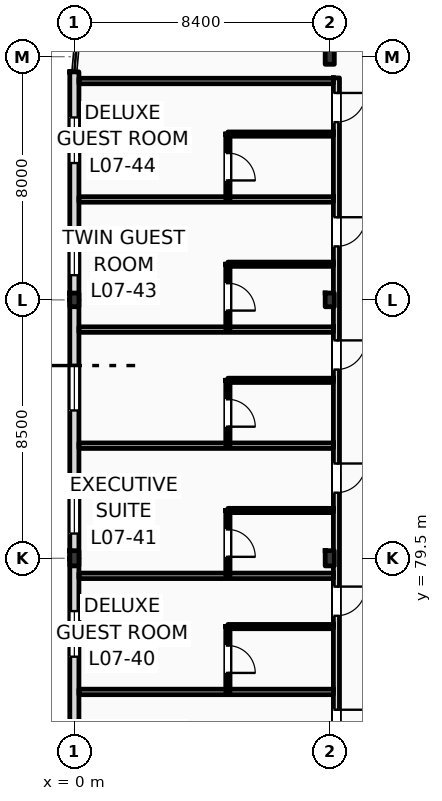
"""IFC4 building model, lengths in metres.
Left out: names, types, materials, properties, quantities, classifications, styles, units other than length and angle.
Written with IfcOpenShell. Run it as: python <this file> out.ifc"""

import sys

from ifc_helpers import new_model, si_unit, direction, frame, frame_2d, origin, origin_2d, place, context, subcontext, project, spatial, rectangle, i_section, extrude, element, fill, save


model = new_model("IFC4")
c1 = context("Model", 3, precision=1e-05, world=origin(), true_north=direction((0.0, 1.0)))
c2 = subcontext(c1, "Body", "Model", "MODEL_VIEW")
j1 = project(units=[si_unit("LENGTHUNIT", "METRE"), si_unit("PLANEANGLEUNIT", "RADIAN")], contexts=[c1])
p1 = place(None, origin())
s1 = spatial("IfcSite", under=j1, at=p1, CompositionType="ELEMENT")
p2 = place(p1, origin())
s2 = spatial("IfcBuilding", under=s1, at=p2, CompositionType="ELEMENT")
p3 = place(p2, frame((0.0, 0.0, 31.8)))
s3 = spatial("IfcBuildingStorey", under=s2, at=p3, CompositionType="ELEMENT", Elevation=31.8)
p4 = place(p3, frame((0.0, 79.5, 0.0), z_axis=(0.0, 0.0, 1.0), x_axis=(1.0, 0.0, 0.0)))
e1 = element("IfcColumn", 1, at=p4, inside=s3, PredefinedType="COLUMN", context=c2, shape_type="SweptSolid", body=[
    extrude(i_section(OverallWidth=0.3, OverallDepth=0.5, WebThickness=0.014, FlangeThickness=0.028, FilletRadius=0.027, at=origin_2d()), origin(), (0.0, 0.0, 1.0), 3.6),
])
p5 = place(p3, frame((0.0, 88.0, 0.0), z_axis=(0.0, 0.0, 1.0), x_axis=(1.0, 0.0, 0.0)))
e2 = element("IfcColumn", 2, at=p5, inside=s3, PredefinedType="COLUMN", context=c2, shape_type="SweptSolid", body=[
    extrude(i_section(OverallWidth=0.3, OverallDepth=0.45, WebThickness=0.014, FlangeThickness=0.026, FilletRadius=0.027, at=origin_2d()), origin(), (0.0, 0.0, 1.0), 3.6),
])
p6 = place(p3, frame((8.4, 79.5, 0.0), z_axis=(0.0, 0.0, 1.0), x_axis=(1.0, 0.0, 0.0)))
e3 = element("IfcColumn", 3, at=p6, inside=s3, PredefinedType="COLUMN", context=c2, shape_type="SweptSolid", body=[
    extrude(i_section(OverallWidth=0.3, OverallDepth=0.5, WebThickness=0.014, FlangeThickness=0.028, FilletRadius=0.027, at=origin_2d()), origin(), (0.0, 0.0, 1.0), 3.6),
])
p7 = place(p3, frame((8.4, 88.0, 0.0), z_axis=(0.0, 0.0, 1.0), x_axis=(1.0, 0.0, 0.0)))
e4 = element("IfcColumn", 4, at=p7, inside=s3, PredefinedType="COLUMN", context=c2, shape_type="SweptSolid", body=[
    extrude(i_section(OverallWidth=0.3, OverallDepth=0.45, WebThickness=0.014, FlangeThickness=0.026, FilletRadius=0.027, at=origin_2d()), origin(), (0.0, 0.0, 1.0), 3.6),
])
p8 = place(p3, frame((8.4, 96.0, 0.0), z_axis=(0.0, 0.0, 1.0), x_axis=(1.0, 0.0, 0.0)))
e5 = element("IfcColumn", 5, at=p8, inside=s3, PredefinedType="COLUMN", context=c2, shape_type="SweptSolid", body=[
    extrude(i_section(OverallWidth=0.3, OverallDepth=0.5, WebThickness=0.014, FlangeThickness=0.028, FilletRadius=0.027, at=origin_2d()), origin(), (0.0, 0.0, 1.0), 3.6),
])
p9 = place(p3, frame((0.0, 71.0, 0.0), z_axis=(0.0, 0.0, 1.0), x_axis=(0.0, 1.0, 0.0)))
e6 = element("IfcWall", 6, at=p9, inside=s3, PredefinedType="STANDARD", context=c2, shape_type="SweptSolid", body=[
    extrude(rectangle(XDim=8.5, YDim=0.3, at=frame_2d((4.25, 0.0))), origin(), (0.0, 0.0, 1.0), 2.99),
])
p10 = place(p9, frame((1.213, 0.0, 0.9)))
e7 = element("IfcOpeningElement", 7, at=p10, cuts=e6, PredefinedType="OPENING", context=c2, shape_type="SweptSolid", body=[
    extrude(rectangle(XDim=1.5, YDim=1.91, at=frame_2d((0.75, 0.955))), frame((0.0, 0.16, 0.0), z_axis=(0.0, -1.0, 0.0), x_axis=(1.0, 0.0, 0.0)), (0.0, 0.0, 1.0), 0.32),
])
p11 = place(p9, frame((5.263, 0.0, 0.9)))
e8 = element("IfcOpeningElement", 8, at=p11, cuts=e6, PredefinedType="OPENING", context=c2, shape_type="SweptSolid", body=[
    extrude(rectangle(XDim=1.5, YDim=1.91, at=frame_2d((0.75, 0.955))), frame((0.0, 0.16, 0.0), z_axis=(0.0, -1.0, 0.0), x_axis=(1.0, 0.0, 0.0)), (0.0, 0.0, 1.0), 0.32),
])
p12 = place(p3, frame((0.0, 79.5, 0.0), z_axis=(0.0, 0.0, 1.0), x_axis=(0.0, 1.0, 0.0)))
e9 = element("IfcWall", 9, at=p12, inside=s3, PredefinedType="STANDARD", context=c2, shape_type="SweptSolid", body=[
    extrude(rectangle(XDim=8.5, YDim=0.3, at=frame_2d((4.25, 0.0))), origin(), (0.0, 0.0, 1.0), 2.99),
])
p13 = place(p12, frame((0.814, 0.0, 0.9)))
e10 = element("IfcOpeningElement", 10, at=p13, cuts=e9, PredefinedType="OPENING", context=c2, shape_type="SweptSolid", body=[
    extrude(rectangle(XDim=1.5, YDim=1.91, at=frame_2d((0.75, 0.955))), frame((0.0, 0.16, 0.0), z_axis=(0.0, -1.0, 0.0), x_axis=(1.0, 0.0, 0.0)), (0.0, 0.0, 1.0), 0.32),
])
p14 = place(p12, frame((4.863, 0.0, 0.9)))
e11 = element("IfcOpeningElement", 11, at=p14, cuts=e9, PredefinedType="OPENING", context=c2, shape_type="SweptSolid", body=[
    extrude(rectangle(XDim=1.5, YDim=1.91, at=frame_2d((0.75, 0.955))), frame((0.0, 0.16, 0.0), z_axis=(0.0, -1.0, 0.0), x_axis=(1.0, 0.0, 0.0)), (0.0, 0.0, 1.0), 0.32),
])
p15 = place(p3, frame((0.0, 88.0, 0.0), z_axis=(0.0, 0.0, 1.0), x_axis=(0.0, 1.0, 0.0)))
e12 = element("IfcWall", 12, at=p15, inside=s3, PredefinedType="STANDARD", context=c2, shape_type="SweptSolid", body=[
    extrude(rectangle(XDim=7.5, YDim=0.3, at=frame_2d((3.75, 0.0))), origin(), (0.0, 0.0, 1.0), 3.36),
])
p16 = place(p15, frame((0.813, 0.0, 0.9)))
e13 = element("IfcOpeningElement", 13, at=p16, cuts=e12, PredefinedType="OPENING", context=c2, shape_type="SweptSolid", body=[
    extrude(rectangle(XDim=1.5, YDim=2.28, at=frame_2d((0.75, 1.14))), frame((0.0, 0.16, 0.0), z_axis=(0.0, -1.0, 0.0), x_axis=(1.0, 0.0, 0.0)), (0.0, 0.0, 1.0), 0.32),
])
p17 = place(p15, frame((4.502, 0.0, 0.9)))
e14 = element("IfcOpeningElement", 14, at=p17, cuts=e12, PredefinedType="OPENING", context=c2, shape_type="SweptSolid", body=[
    extrude(rectangle(XDim=1.5, YDim=2.28, at=frame_2d((0.75, 1.14))), frame((0.0, 0.16, 0.0), z_axis=(0.0, -1.0, 0.0), x_axis=(1.0, 0.0, 0.0)), (0.0, 0.0, 1.0), 0.32),
])
p18 = place(p3, frame((8.62, 62.64, 0.0), z_axis=(0.0, 0.0, 1.0), x_axis=(0.0, 1.0, 0.0)))
e15 = element("IfcWall", 15, at=p18, inside=s3, PredefinedType="PARTITIONING", context=c2, shape_type="SweptSolid", body=[
    extrude(rectangle(XDim=32.66, YDim=0.2, at=frame_2d((16.33, 0.0))), origin(), (0.0, 0.0, 1.0), 2.99),
])
p19 = place(p18, frame((2.857, 0.0, 0.0)))
e16 = element("IfcOpeningElement", 16, at=p19, cuts=e15, PredefinedType="OPENING", context=c2, shape_type="SweptSolid", body=[
    extrude(rectangle(XDim=0.96, YDim=2.2, at=frame_2d((0.48, 1.1))), frame((0.0, 0.11, 0.0), z_axis=(0.0, -1.0, 0.0), x_axis=(1.0, 0.0, 0.0)), (0.0, 0.0, 1.0), 0.22),
])
p20 = place(p18, frame((4.719, 0.0, 0.0)))
e17 = element("IfcOpeningElement", 17, at=p20, cuts=e15, PredefinedType="OPENING", context=c2, shape_type="SweptSolid", body=[
    extrude(rectangle(XDim=0.96, YDim=2.2, at=frame_2d((0.48, 1.1))), frame((0.0, 0.11, 0.0), z_axis=(0.0, -1.0, 0.0), x_axis=(1.0, 0.0, 0.0)), (0.0, 0.0, 1.0), 0.22),
])
p21 = place(p18, frame((10.918, 0.0, 0.0)))
e18 = element("IfcOpeningElement", 18, at=p21, cuts=e15, PredefinedType="OPENING", context=c2, shape_type="SweptSolid", body=[
    extrude(rectangle(XDim=0.96, YDim=2.2, at=frame_2d((0.48, 1.1))), frame((0.0, 0.11, 0.0), z_axis=(0.0, -1.0, 0.0), x_axis=(1.0, 0.0, 0.0)), (0.0, 0.0, 1.0), 0.22),
])
p22 = place(p18, frame((14.969, 0.0, 0.0)))
e19 = element("IfcOpeningElement", 19, at=p22, cuts=e15, PredefinedType="OPENING", context=c2, shape_type="SweptSolid", body=[
    extrude(rectangle(XDim=0.96, YDim=2.2, at=frame_2d((0.48, 1.1))), frame((0.0, 0.11, 0.0), z_axis=(0.0, -1.0, 0.0), x_axis=(1.0, 0.0, 0.0)), (0.0, 0.0, 1.0), 0.22),
])
p23 = place(p18, frame((19.018, 0.0, 0.0)))
e20 = element("IfcOpeningElement", 20, at=p23, cuts=e15, PredefinedType="OPENING", context=c2, shape_type="SweptSolid", body=[
    extrude(rectangle(XDim=0.96, YDim=2.2, at=frame_2d((0.48, 1.1))), frame((0.0, 0.11, 0.0), z_axis=(0.0, -1.0, 0.0), x_axis=(1.0, 0.0, 0.0)), (0.0, 0.0, 1.0), 0.22),
])
p24 = place(p18, frame((23.068, 0.0, 0.0)))
e21 = element("IfcOpeningElement", 21, at=p24, cuts=e15, PredefinedType="OPENING", context=c2, shape_type="SweptSolid", body=[
    extrude(rectangle(XDim=0.96, YDim=2.2, at=frame_2d((0.48, 1.1))), frame((0.0, 0.11, 0.0), z_axis=(0.0, -1.0, 0.0), x_axis=(1.0, 0.0, 0.0)), (0.0, 0.0, 1.0), 0.22),
])
p25 = place(p18, frame((27.119, 0.0, 0.0)))
e22 = element("IfcOpeningElement", 22, at=p25, cuts=e15, PredefinedType="OPENING", context=c2, shape_type="SweptSolid", body=[
    extrude(rectangle(XDim=0.96, YDim=2.2, at=frame_2d((0.48, 1.1))), frame((0.0, 0.11, 0.0), z_axis=(0.0, -1.0, 0.0), x_axis=(1.0, 0.0, 0.0)), (0.0, 0.0, 1.0), 0.22),
])
p26 = place(p18, frame((31.207, 0.0, 0.0)))
e23 = element("IfcOpeningElement", 23, at=p26, cuts=e15, PredefinedType="OPENING", context=c2, shape_type="SweptSolid", body=[
    extrude(rectangle(XDim=0.96, YDim=2.2, at=frame_2d((0.48, 1.1))), frame((0.0, 0.11, 0.0), z_axis=(0.0, -1.0, 0.0), x_axis=(1.0, 0.0, 0.0)), (0.0, 0.0, 1.0), 0.22),
])
for number, where, z_axis, x_axis in (
    (24, (0.15, 75.104, 0.0), (0.0, 0.0, 1.0), (1.0, 0.0, 0.0)),
    (25, (0.15, 78.923, 0.0), (0.0, 0.0, 1.0), (1.0, 0.0, 0.0)),
):
    element("IfcWall", number, at=place(p3, frame(where, z_axis=z_axis, x_axis=x_axis)), inside=s3, PredefinedType="PARTITIONING", context=c2, shape_type="SweptSolid", body=[
        extrude(rectangle(XDim=8.37, YDim=0.18, at=frame_2d((4.185, 0.0))), origin(), (0.0, 0.0, 1.0), 3.36),
    ])
p27 = place(p3, frame((5.05, 77.254, 0.0), z_axis=(0.0, 0.0, 1.0), x_axis=(1.0, 0.0, 0.0)))
e26 = element("IfcWall", 26, at=p27, inside=s3, PredefinedType="PARTITIONING", context=c2, shape_type="SweptSolid", body=[
    extrude(rectangle(XDim=3.47, YDim=0.14, at=frame_2d((1.735, 0.0))), origin(), (0.0, 0.0, 1.0), 3.36),
])
p28 = place(p3, frame((5.05, 75.104, 0.0), z_axis=(0.0, 0.0, 1.0), x_axis=(0.0, 1.0, 0.0)))
e27 = element("IfcWall", 27, at=p28, inside=s3, PredefinedType="PARTITIONING", context=c2, shape_type="SweptSolid", body=[
    extrude(rectangle(XDim=2.15, YDim=0.14, at=frame_2d((1.075, 0.0))), origin(), (0.0, 0.0, 1.0), 3.36),
])
p29 = place(p28, frame((0.625, 0.0, 0.0)))
e28 = element("IfcOpeningElement", 28, at=p29, cuts=e27, PredefinedType="OPENING", context=c2, shape_type="SweptSolid", body=[
    extrude(rectangle(XDim=0.9, YDim=2.1, at=frame_2d((0.45, 1.05))), frame((0.0, 0.08, 0.0), z_axis=(0.0, -1.0, 0.0), x_axis=(1.0, 0.0, 0.0)), (0.0, 0.0, 1.0), 0.16),
])
p30 = place(p3, frame((0.15, 83.204, 0.0), z_axis=(0.0, 0.0, 1.0), x_axis=(1.0, 0.0, 0.0)))
e29 = element("IfcWall", 29, at=p30, inside=s3, PredefinedType="PARTITIONING", context=c2, shape_type="SweptSolid", body=[
    extrude(rectangle(XDim=8.37, YDim=0.18, at=frame_2d((4.185, 0.0))), origin(), (0.0, 0.0, 1.0), 3.36),
])
p31 = place(p3, frame((5.05, 81.073, 0.0), z_axis=(0.0, 0.0, 1.0), x_axis=(1.0, 0.0, 0.0)))
e30 = element("IfcWall", 30, at=p31, inside=s3, PredefinedType="PARTITIONING", context=c2, shape_type="SweptSolid", body=[
    extrude(rectangle(XDim=3.47, YDim=0.14, at=frame_2d((1.735, 0.0))), origin(), (0.0, 0.0, 1.0), 3.36),
])
p32 = place(p3, frame((5.05, 78.923, 0.0), z_axis=(0.0, 0.0, 1.0), x_axis=(0.0, 1.0, 0.0)))
e31 = element("IfcWall", 31, at=p32, inside=s3, PredefinedType="PARTITIONING", context=c2, shape_type="SweptSolid", body=[
    extrude(rectangle(XDim=2.15, YDim=0.14, at=frame_2d((1.075, 0.0))), origin(), (0.0, 0.0, 1.0), 3.36),
])
p33 = place(p32, frame((0.625, 0.0, 0.0)))
e32 = element("IfcOpeningElement", 32, at=p33, cuts=e31, PredefinedType="OPENING", context=c2, shape_type="SweptSolid", body=[
    extrude(rectangle(XDim=0.9, YDim=2.1, at=frame_2d((0.45, 1.05))), frame((0.0, 0.08, 0.0), z_axis=(0.0, -1.0, 0.0), x_axis=(1.0, 0.0, 0.0)), (0.0, 0.0, 1.0), 0.16),
])
p34 = place(p3, frame((0.15, 87.023, 0.0), z_axis=(0.0, 0.0, 1.0), x_axis=(1.0, 0.0, 0.0)))
e33 = element("IfcWall", 33, at=p34, inside=s3, PredefinedType="PARTITIONING", context=c2, shape_type="SweptSolid", body=[
    extrude(rectangle(XDim=8.37, YDim=0.18, at=frame_2d((4.185, 0.0))), origin(), (0.0, 0.0, 1.0), 3.36),
])
p35 = place(p3, frame((5.05, 85.354, 0.0), z_axis=(0.0, 0.0, 1.0), x_axis=(1.0, 0.0, 0.0)))
e34 = element("IfcWall", 34, at=p35, inside=s3, PredefinedType="PARTITIONING", context=c2, shape_type="SweptSolid", body=[
    extrude(rectangle(XDim=3.47, YDim=0.14, at=frame_2d((1.735, 0.0))), origin(), (0.0, 0.0, 1.0), 3.36),
])
p36 = place(p3, frame((5.05, 83.204, 0.0), z_axis=(0.0, 0.0, 1.0), x_axis=(0.0, 1.0, 0.0)))
e35 = element("IfcWall", 35, at=p36, inside=s3, PredefinedType="PARTITIONING", context=c2, shape_type="SweptSolid", body=[
    extrude(rectangle(XDim=2.15, YDim=0.14, at=frame_2d((1.075, 0.0))), origin(), (0.0, 0.0, 1.0), 3.36),
])
p37 = place(p36, frame((0.625, 0.0, 0.0)))
e36 = element("IfcOpeningElement", 36, at=p37, cuts=e35, PredefinedType="OPENING", context=c2, shape_type="SweptSolid", body=[
    extrude(rectangle(XDim=0.9, YDim=2.1, at=frame_2d((0.45, 1.05))), frame((0.0, 0.08, 0.0), z_axis=(0.0, -1.0, 0.0), x_axis=(1.0, 0.0, 0.0)), (0.0, 0.0, 1.0), 0.16),
])
p38 = place(p3, frame((0.15, 91.304, 0.0), z_axis=(0.0, 0.0, 1.0), x_axis=(1.0, 0.0, 0.0)))
e37 = element("IfcWall", 37, at=p38, inside=s3, PredefinedType="PARTITIONING", context=c2, shape_type="SweptSolid", body=[
    extrude(rectangle(XDim=8.37, YDim=0.18, at=frame_2d((4.185, 0.0))), origin(), (0.0, 0.0, 1.0), 3.36),
])
p39 = place(p3, frame((5.05, 89.173, 0.0), z_axis=(0.0, 0.0, 1.0), x_axis=(1.0, 0.0, 0.0)))
e38 = element("IfcWall", 38, at=p39, inside=s3, PredefinedType="PARTITIONING", context=c2, shape_type="SweptSolid", body=[
    extrude(rectangle(XDim=3.47, YDim=0.14, at=frame_2d((1.735, 0.0))), origin(), (0.0, 0.0, 1.0), 3.36),
])
p40 = place(p3, frame((5.05, 87.023, 0.0), z_axis=(0.0, 0.0, 1.0), x_axis=(0.0, 1.0, 0.0)))
e39 = element("IfcWall", 39, at=p40, inside=s3, PredefinedType="PARTITIONING", context=c2, shape_type="SweptSolid", body=[
    extrude(rectangle(XDim=2.15, YDim=0.14, at=frame_2d((1.075, 0.0))), origin(), (0.0, 0.0, 1.0), 3.36),
])
p41 = place(p40, frame((0.625, 0.0, 0.0)))
e40 = element("IfcOpeningElement", 40, at=p41, cuts=e39, PredefinedType="OPENING", context=c2, shape_type="SweptSolid", body=[
    extrude(rectangle(XDim=0.9, YDim=2.1, at=frame_2d((0.45, 1.05))), frame((0.0, 0.08, 0.0), z_axis=(0.0, -1.0, 0.0), x_axis=(1.0, 0.0, 0.0)), (0.0, 0.0, 1.0), 0.16),
])
p42 = place(p3, frame((0.15, 95.2, 0.0), z_axis=(0.0, 0.0, 1.0), x_axis=(1.0, 0.0, 0.0)))
e41 = element("IfcWall", 41, at=p42, inside=s3, PredefinedType="PARTITIONING", context=c2, shape_type="SweptSolid", body=[
    extrude(rectangle(XDim=8.37, YDim=0.18, at=frame_2d((4.185, 0.0))), origin(), (0.0, 0.0, 1.0), 3.36),
])
p43 = place(p3, frame((5.05, 93.454, 0.0), z_axis=(0.0, 0.0, 1.0), x_axis=(1.0, 0.0, 0.0)))
e42 = element("IfcWall", 42, at=p43, inside=s3, PredefinedType="PARTITIONING", context=c2, shape_type="SweptSolid", body=[
    extrude(rectangle(XDim=3.47, YDim=0.14, at=frame_2d((1.735, 0.0))), origin(), (0.0, 0.0, 1.0), 3.36),
])
p44 = place(p3, frame((5.05, 91.304, 0.0), z_axis=(0.0, 0.0, 1.0), x_axis=(0.0, 1.0, 0.0)))
e43 = element("IfcWall", 43, at=p44, inside=s3, PredefinedType="PARTITIONING", context=c2, shape_type="SweptSolid", body=[
    extrude(rectangle(XDim=2.15, YDim=0.14, at=frame_2d((1.075, 0.0))), origin(), (0.0, 0.0, 1.0), 3.36),
])
p45 = place(p44, frame((0.625, 0.0, 0.0)))
e44 = element("IfcOpeningElement", 44, at=p45, cuts=e43, PredefinedType="OPENING", context=c2, shape_type="SweptSolid", body=[
    extrude(rectangle(XDim=0.9, YDim=2.1, at=frame_2d((0.45, 1.05))), frame((0.0, 0.08, 0.0), z_axis=(0.0, -1.0, 0.0), x_axis=(1.0, 0.0, 0.0)), (0.0, 0.0, 1.0), 0.16),
])
p46 = place(p11, origin())
e45 = element("IfcWindow", 45, at=p46, inside=s3, PartitioningType="DOUBLE_PANEL_VERTICAL", PredefinedType="WINDOW", context=c2, shape_type="SweptSolid", body=[
    extrude(rectangle(XDim=1.5, YDim=1.91, at=frame_2d((0.75, 0.955))), frame((0.0, 0.03, 0.0), z_axis=(0.0, -1.0, 0.0), x_axis=(1.0, 0.0, 0.0)), (0.0, 0.0, 1.0), 0.06),
])
fill(e8, e45)
p47 = place(p13, origin())
e46 = element("IfcWindow", 46, at=p47, inside=s3, PartitioningType="DOUBLE_PANEL_VERTICAL", PredefinedType="WINDOW", context=c2, shape_type="SweptSolid", body=[
    extrude(rectangle(XDim=1.5, YDim=1.91, at=frame_2d((0.75, 0.955))), frame((0.0, 0.03, 0.0), z_axis=(0.0, -1.0, 0.0), x_axis=(1.0, 0.0, 0.0)), (0.0, 0.0, 1.0), 0.06),
])
fill(e10, e46)
p48 = place(p14, origin())
e47 = element("IfcWindow", 47, at=p48, inside=s3, PartitioningType="DOUBLE_PANEL_VERTICAL", PredefinedType="WINDOW", context=c2, shape_type="SweptSolid", body=[
    extrude(rectangle(XDim=1.5, YDim=1.91, at=frame_2d((0.75, 0.955))), frame((0.0, 0.03, 0.0), z_axis=(0.0, -1.0, 0.0), x_axis=(1.0, 0.0, 0.0)), (0.0, 0.0, 1.0), 0.06),
])
fill(e11, e47)
p49 = place(p16, origin())
e48 = element("IfcWindow", 48, at=p49, inside=s3, PartitioningType="DOUBLE_PANEL_VERTICAL", PredefinedType="WINDOW", context=c2, shape_type="SweptSolid", body=[
    extrude(rectangle(XDim=1.5, YDim=2.28, at=frame_2d((0.75, 1.14))), frame((0.0, 0.03, 0.0), z_axis=(0.0, -1.0, 0.0), x_axis=(1.0, 0.0, 0.0)), (0.0, 0.0, 1.0), 0.06),
])
fill(e13, e48)
p50 = place(p17, origin())
e49 = element("IfcWindow", 49, at=p50, inside=s3, PartitioningType="DOUBLE_PANEL_VERTICAL", PredefinedType="WINDOW", context=c2, shape_type="SweptSolid", body=[
    extrude(rectangle(XDim=1.5, YDim=2.28, at=frame_2d((0.75, 1.14))), frame((0.0, 0.03, 0.0), z_axis=(0.0, -1.0, 0.0), x_axis=(1.0, 0.0, 0.0)), (0.0, 0.0, 1.0), 0.06),
])
fill(e14, e49)
p51 = place(p21, frame((0.96, 0.0, 0.0), z_axis=(0.0, 0.0, 1.0), x_axis=(-1.0, 0.0, 0.0)))
e50 = element("IfcDoor", 50, at=p51, inside=s3, OperationType="SINGLE_SWING_RIGHT", PredefinedType="DOOR", context=c2, shape_type="SweptSolid", body=[
    extrude(rectangle(XDim=0.96, YDim=2.2, at=frame_2d((0.48, 1.1))), frame((0.0, 0.025, 0.0), z_axis=(0.0, -1.0, 0.0), x_axis=(1.0, 0.0, 0.0)), (0.0, 0.0, 1.0), 0.05),
])
fill(e18, e50)
p52 = place(p22, frame((0.96, 0.0, 0.0), z_axis=(0.0, 0.0, 1.0), x_axis=(-1.0, 0.0, 0.0)))
e51 = element("IfcDoor", 51, at=p52, inside=s3, OperationType="SINGLE_SWING_RIGHT", PredefinedType="DOOR", context=c2, shape_type="SweptSolid", body=[
    extrude(rectangle(XDim=0.96, YDim=2.2, at=frame_2d((0.48, 1.1))), frame((0.0, 0.025, 0.0), z_axis=(0.0, -1.0, 0.0), x_axis=(1.0, 0.0, 0.0)), (0.0, 0.0, 1.0), 0.05),
])
fill(e19, e51)
p53 = place(p29, frame((0.9, 0.0, 0.0), z_axis=(0.0, 0.0, 1.0), x_axis=(-1.0, 0.0, 0.0)))
e52 = element("IfcDoor", 52, at=p53, inside=s3, OperationType="SINGLE_SWING_LEFT", PredefinedType="DOOR", context=c2, shape_type="SweptSolid", body=[
    extrude(rectangle(XDim=0.9, YDim=2.1, at=frame_2d((0.45, 1.05))), frame((0.0, 0.025, 0.0), z_axis=(0.0, -1.0, 0.0), x_axis=(1.0, 0.0, 0.0)), (0.0, 0.0, 1.0), 0.05),
])
fill(e28, e52)
p54 = place(p23, frame((0.96, 0.0, 0.0), z_axis=(0.0, 0.0, 1.0), x_axis=(-1.0, 0.0, 0.0)))
e53 = element("IfcDoor", 53, at=p54, inside=s3, OperationType="SINGLE_SWING_RIGHT", PredefinedType="DOOR", context=c2, shape_type="SweptSolid", body=[
    extrude(rectangle(XDim=0.96, YDim=2.2, at=frame_2d((0.48, 1.1))), frame((0.0, 0.025, 0.0), z_axis=(0.0, -1.0, 0.0), x_axis=(1.0, 0.0, 0.0)), (0.0, 0.0, 1.0), 0.05),
])
fill(e20, e53)
p55 = place(p33, frame((0.9, 0.0, 0.0), z_axis=(0.0, 0.0, 1.0), x_axis=(-1.0, 0.0, 0.0)))
e54 = element("IfcDoor", 54, at=p55, inside=s3, OperationType="SINGLE_SWING_LEFT", PredefinedType="DOOR", context=c2, shape_type="SweptSolid", body=[
    extrude(rectangle(XDim=0.9, YDim=2.1, at=frame_2d((0.45, 1.05))), frame((0.0, 0.025, 0.0), z_axis=(0.0, -1.0, 0.0), x_axis=(1.0, 0.0, 0.0)), (0.0, 0.0, 1.0), 0.05),
])
fill(e32, e54)
p56 = place(p24, frame((0.96, 0.0, 0.0), z_axis=(0.0, 0.0, 1.0), x_axis=(-1.0, 0.0, 0.0)))
e55 = element("IfcDoor", 55, at=p56, inside=s3, OperationType="SINGLE_SWING_RIGHT", PredefinedType="DOOR", context=c2, shape_type="SweptSolid", body=[
    extrude(rectangle(XDim=0.96, YDim=2.2, at=frame_2d((0.48, 1.1))), frame((0.0, 0.025, 0.0), z_axis=(0.0, -1.0, 0.0), x_axis=(1.0, 0.0, 0.0)), (0.0, 0.0, 1.0), 0.05),
])
fill(e21, e55)
p57 = place(p37, frame((0.9, 0.0, 0.0), z_axis=(0.0, 0.0, 1.0), x_axis=(-1.0, 0.0, 0.0)))
e56 = element("IfcDoor", 56, at=p57, inside=s3, OperationType="SINGLE_SWING_LEFT", PredefinedType="DOOR", context=c2, shape_type="SweptSolid", body=[
    extrude(rectangle(XDim=0.9, YDim=2.1, at=frame_2d((0.45, 1.05))), frame((0.0, 0.025, 0.0), z_axis=(0.0, -1.0, 0.0), x_axis=(1.0, 0.0, 0.0)), (0.0, 0.0, 1.0), 0.05),
])
fill(e36, e56)
p58 = place(p25, frame((0.96, 0.0, 0.0), z_axis=(0.0, 0.0, 1.0), x_axis=(-1.0, 0.0, 0.0)))
e57 = element("IfcDoor", 57, at=p58, inside=s3, OperationType="SINGLE_SWING_RIGHT", PredefinedType="DOOR", context=c2, shape_type="SweptSolid", body=[
    extrude(rectangle(XDim=0.96, YDim=2.2, at=frame_2d((0.48, 1.1))), frame((0.0, 0.025, 0.0), z_axis=(0.0, -1.0, 0.0), x_axis=(1.0, 0.0, 0.0)), (0.0, 0.0, 1.0), 0.05),
])
fill(e22, e57)
p59 = place(p41, frame((0.9, 0.0, 0.0), z_axis=(0.0, 0.0, 1.0), x_axis=(-1.0, 0.0, 0.0)))
e58 = element("IfcDoor", 58, at=p59, inside=s3, OperationType="SINGLE_SWING_LEFT", PredefinedType="DOOR", context=c2, shape_type="SweptSolid", body=[
    extrude(rectangle(XDim=0.9, YDim=2.1, at=frame_2d((0.45, 1.05))), frame((0.0, 0.025, 0.0), z_axis=(0.0, -1.0, 0.0), x_axis=(1.0, 0.0, 0.0)), (0.0, 0.0, 1.0), 0.05),
])
fill(e40, e58)
p60 = place(p26, frame((0.96, 0.0, 0.0), z_axis=(0.0, 0.0, 1.0), x_axis=(-1.0, 0.0, 0.0)))
e59 = element("IfcDoor", 59, at=p60, inside=s3, OperationType="SINGLE_SWING_RIGHT", PredefinedType="DOOR", context=c2, shape_type="SweptSolid", body=[
    extrude(rectangle(XDim=0.96, YDim=2.2, at=frame_2d((0.48, 1.1))), frame((0.0, 0.025, 0.0), z_axis=(0.0, -1.0, 0.0), x_axis=(1.0, 0.0, 0.0)), (0.0, 0.0, 1.0), 0.05),
])
fill(e23, e59)
p61 = place(p45, frame((0.9, 0.0, 0.0), z_axis=(0.0, 0.0, 1.0), x_axis=(-1.0, 0.0, 0.0)))
e60 = element("IfcDoor", 60, at=p61, inside=s3, OperationType="SINGLE_SWING_LEFT", PredefinedType="DOOR", context=c2, shape_type="SweptSolid", body=[
    extrude(rectangle(XDim=0.9, YDim=2.1, at=frame_2d((0.45, 1.05))), frame((0.0, 0.025, 0.0), z_axis=(0.0, -1.0, 0.0), x_axis=(1.0, 0.0, 0.0)), (0.0, 0.0, 1.0), 0.05),
])
fill(e44, e60)
save(model, sys.argv[1])
